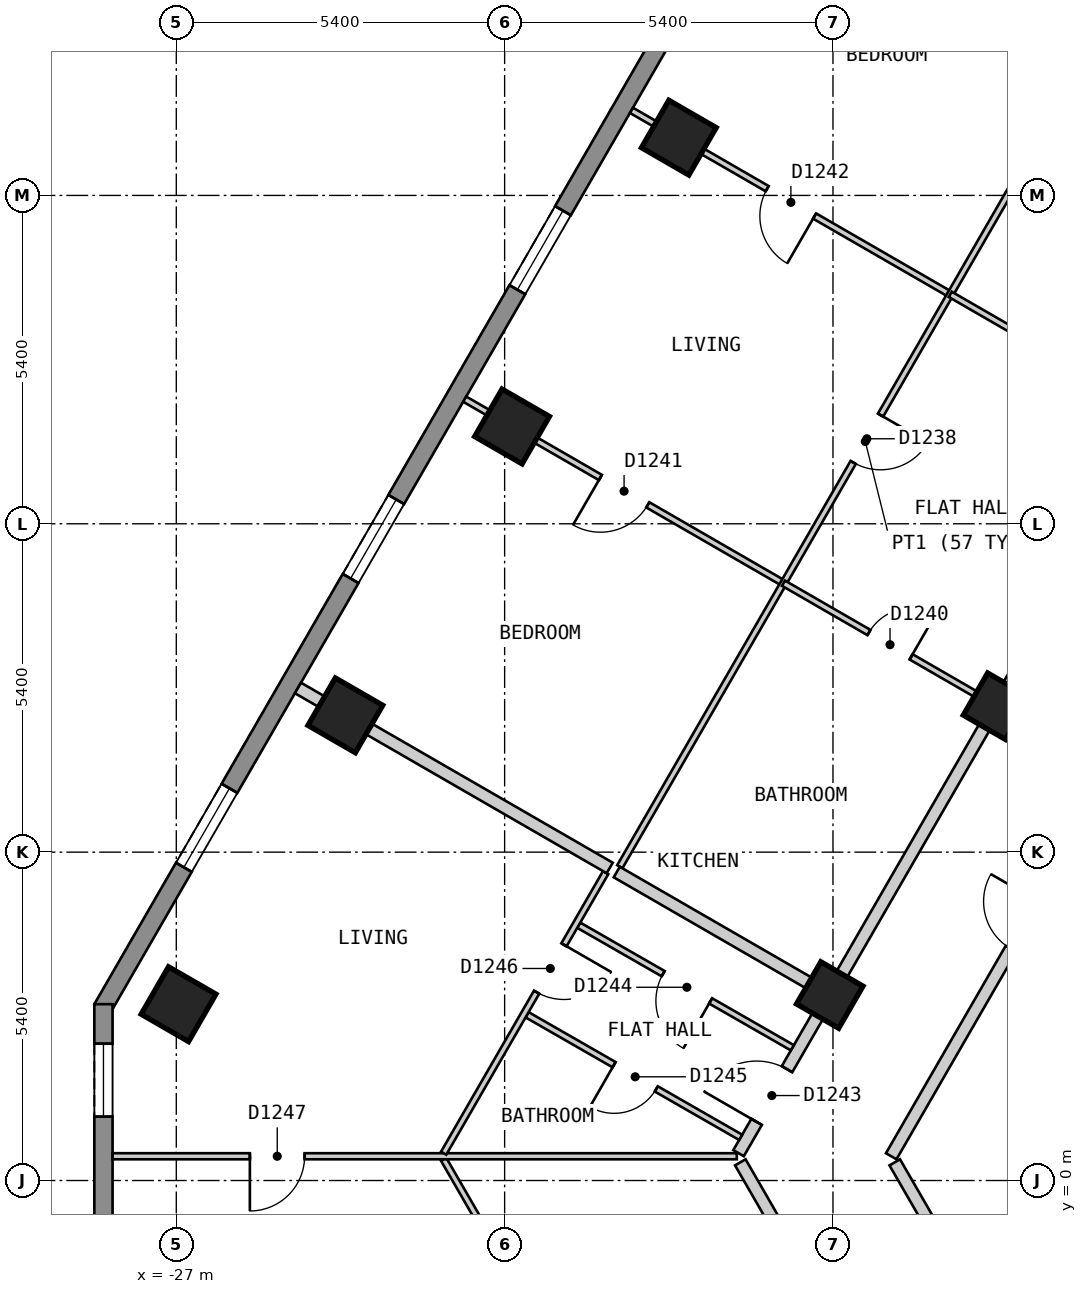
"""IFC4 building model, lengths in metres.
Left out: names, types, materials, properties, quantities, classifications, styles, units other than length and angle.
Written with IfcOpenShell. Run it as: python <this file> out.ifc"""

import sys

from ifc_helpers import new_model, si_unit, direction, frame, frame_2d, origin, origin_2d, place, context, subcontext, project, spatial, polyline, rectangle, outline, extrude, element, fill, save


model = new_model("IFC4")
c1 = context("Model", 3, precision=1e-05, world=origin(), true_north=direction((0.0, 1.0)))
c2 = subcontext(c1, "Body", "Model", "MODEL_VIEW")
j1 = project(units=[si_unit("LENGTHUNIT", "METRE"), si_unit("PLANEANGLEUNIT", "RADIAN")], contexts=[c1])
p1 = place(None, origin())
s1 = spatial("IfcSite", under=j1, at=p1, CompositionType="ELEMENT")
p2 = place(p1, origin())
s2 = spatial("IfcBuilding", under=s1, at=p2, CompositionType="ELEMENT")
p3 = place(p2, frame((0.0, 0.0, 129.6)))
s3 = spatial("IfcBuildingStorey", under=s2, at=p3, CompositionType="ELEMENT", Elevation=129.6)
for number, where, z_axis, x_axis in (
    (1, (-18.735, 17.15, 0.0), (0.0, 0.0, 1.0), (-0.5, -0.866, 0.0)),
    (2, (-21.478, 12.4, 0.0), (0.0, 0.0, 1.0), (-0.5, -0.866, 0.0)),
    (3, (-24.22, 7.65, 0.0), (0.0, 0.0, 1.0), (-0.5, -0.866, 0.0)),
    (4, (-26.963, 2.9, 0.0), (0.0, 0.0, 1.0), (-0.5, -0.866, 0.0)),
):
    element("IfcColumn", number, at=place(p3, frame(where, z_axis=z_axis, x_axis=x_axis)), inside=s3, PredefinedType="COLUMN", context=c2, shape_type="SweptSolid", body=[
        extrude(rectangle(XDim=0.9, YDim=0.9, at=origin_2d()), origin(), (0.0, 0.0, 1.0), 3.0),
    ])
for number, where, z_axis, x_axis in (
    (5, (-13.51, 7.8, 0.0), (0.0, 0.0, 1.0), (-0.5, -0.866, 0.0)),
    (6, (-16.253, 3.05, 0.0), (0.0, 0.0, 1.0), (-0.5, -0.866, 0.0)),
):
    element("IfcColumn", number, at=place(p3, frame(where, z_axis=z_axis, x_axis=x_axis)), inside=s3, PredefinedType="COLUMN", context=c2, shape_type="SweptSolid", body=[
        extrude(rectangle(XDim=0.8, YDim=0.8, at=origin_2d()), origin(), (0.0, 0.0, 1.0), 3.0),
    ])
p4 = place(p3, frame((-16.555, 23.025, 0.0), z_axis=(0.0, 0.0, 1.0), x_axis=(-0.500020536353, -0.866013546791, 0.0)))
e7 = element("IfcWall", 7, at=p4, inside=s3, PredefinedType="SOLIDWALL", context=c2, shape_type="SweptSolid", body=[
    extrude(outline(polyline([(0.0, -0.15), (23.325, -0.15), (23.245, 0.15), (0.08, 0.15), (0.0, -0.15)])), origin(), (0.0, 0.0, 1.0), 2.7),
])
p5 = place(p4, frame((2.685, 0.0, 0.15)))
e8 = element("IfcOpeningElement", 8, at=p5, cuts=e7, PredefinedType="OPENING", context=c2, shape_type="SweptSolid", body=[
    extrude(rectangle(XDim=1.5, YDim=2.1, at=frame_2d((0.75, 1.05))), frame((0.0, 0.16, 0.0), z_axis=(0.0, -1.0, 0.0), x_axis=(1.0, 0.0, 0.0)), (0.0, 0.0, 1.0), 0.32),
])
p6 = place(p4, frame((8.171, 0.0, 0.15)))
e9 = element("IfcOpeningElement", 9, at=p6, cuts=e7, PredefinedType="OPENING", context=c2, shape_type="SweptSolid", body=[
    extrude(rectangle(XDim=1.5, YDim=2.1, at=frame_2d((0.75, 1.05))), frame((0.0, 0.16, 0.0), z_axis=(0.0, -1.0, 0.0), x_axis=(1.0, 0.0, 0.0)), (0.0, 0.0, 1.0), 0.32),
])
p7 = place(p4, frame((13.655, 0.0, 0.15)))
e10 = element("IfcOpeningElement", 10, at=p7, cuts=e7, PredefinedType="OPENING", context=c2, shape_type="SweptSolid", body=[
    extrude(rectangle(XDim=1.5, YDim=2.1, at=frame_2d((0.75, 1.05))), frame((0.0, 0.16, 0.0), z_axis=(0.0, -1.0, 0.0), x_axis=(1.0, 0.0, 0.0)), (0.0, 0.0, 1.0), 0.32),
])
p8 = place(p4, frame((19.14, 0.0, 0.15)))
e11 = element("IfcOpeningElement", 11, at=p8, cuts=e7, PredefinedType="OPENING", context=c2, shape_type="SweptSolid", body=[
    extrude(rectangle(XDim=1.5, YDim=2.1, at=frame_2d((0.75, 1.05))), frame((0.0, 0.16, 0.0), z_axis=(0.0, -1.0, 0.0), x_axis=(1.0, 0.0, 0.0)), (0.0, 0.0, 1.0), 0.32),
])
p9 = place(p3, frame((-28.198, 2.9, 0.0), z_axis=(0.0, 0.0, 1.0), x_axis=(0.0, -1.0, 0.0)))
e12 = element("IfcWall", 12, at=p9, inside=s3, PredefinedType="SOLIDWALL", context=c2, shape_type="SweptSolid", body=[
    extrude(outline(polyline([(0.0, -0.15), (5.0, -0.15), (4.92, 0.15), (0.08, 0.15), (0.0, -0.15)])), origin(), (0.0, 0.0, 1.0), 2.7),
])
p10 = place(p9, frame((0.65, 0.0, 0.15)))
e13 = element("IfcOpeningElement", 13, at=p10, cuts=e12, PredefinedType="OPENING", context=c2, shape_type="SweptSolid", body=[
    extrude(rectangle(XDim=1.2, YDim=2.1, at=frame_2d((0.6, 1.05))), frame((0.0, 0.16, 0.0), z_axis=(0.0, -1.0, 0.0), x_axis=(1.0, 0.0, 0.0)), (0.0, 0.0, 1.0), 0.32),
])
p11 = place(p3, frame((-15.184, 0.299, 0.0), z_axis=(0.0, 0.0, 1.0), x_axis=(0.500149577091, -0.865939028186, 0.0)))
e14 = element("IfcWall", 14, at=p11, inside=s3, PredefinedType="PARTITIONING", context=c2, shape_type="SweptSolid", body=[
    extrude(rectangle(XDim=3.463, YDim=0.2, at=frame_2d((1.732, 0.0))), origin(), (0.0, 0.0, 1.0), 2.7),
])
p12 = place(p3, frame((-17.724, 0.299, 0.0), z_axis=(0.0, 0.0, 1.0), x_axis=(0.499910220442, -0.866077231832, 0.0)))
e15 = element("IfcWall", 15, at=p12, inside=s3, PredefinedType="PARTITIONING", context=c2, shape_type="SweptSolid", body=[
    extrude(rectangle(XDim=3.189, YDim=0.2, at=frame_2d((1.594, 0.0))), origin(), (0.0, 0.0, 1.0), 2.7),
])
p13 = place(p3, frame((-15.242, 0.399, 0.0), z_axis=(0.0, 0.0, 1.0), x_axis=(0.499953615651, 0.866052182145, 0.0)))
e16 = element("IfcWall", 16, at=p13, inside=s3, PredefinedType="PARTITIONING", context=c2, shape_type="SweptSolid", body=[
    extrude(rectangle(XDim=8.777, YDim=0.2, at=frame_2d((4.388, 0.0))), origin(), (0.0, 0.0, 1.0), 2.7),
])
p14 = place(p13, frame((3.938, 0.0, 0.0)))
e17 = element("IfcOpeningElement", 17, at=p14, cuts=e16, PredefinedType="OPENING", context=c2, shape_type="SweptSolid", body=[
    extrude(rectangle(XDim=0.9, YDim=2.1, at=frame_2d((0.45, 1.05))), frame((0.0, 0.11, 0.0), z_axis=(0.0, -1.0, 0.0), x_axis=(1.0, 0.0, 0.0)), (0.0, 0.0, 1.0), 0.22),
])
p15 = place(p3, frame((-17.753, 0.45, 0.0), z_axis=(0.0, 0.0, 1.0), x_axis=(0.499988552313, 0.866032013009, 0.0)))
e18 = element("IfcWall", 18, at=p15, inside=s3, PredefinedType="PARTITIONING", context=c2, shape_type="SweptSolid", body=[
    extrude(rectangle(XDim=16.917, YDim=0.2, at=frame_2d((8.458, 0.0))), origin(), (0.0, 0.0, 1.0), 2.7),
])
p16 = place(p15, frame((10.73, 0.0, 0.0)))
e19 = element("IfcOpeningElement", 19, at=p16, cuts=e18, PredefinedType="OPENING", context=c2, shape_type="SweptSolid", body=[
    extrude(rectangle(XDim=1.0, YDim=2.1, at=frame_2d((0.5, 1.05))), frame((0.0, 0.11, 0.0), z_axis=(0.0, -1.0, 0.0), x_axis=(1.0, 0.0, 0.0)), (0.0, 0.0, 1.0), 0.22),
])
p17 = place(p15, frame((0.594, 0.0, 0.0)))
e20 = element("IfcOpeningElement", 20, at=p17, cuts=e18, PredefinedType="OPENING", context=c2, shape_type="SweptSolid", body=[
    extrude(rectangle(XDim=1.0, YDim=2.1, at=frame_2d((0.5, 1.05))), frame((0.0, 0.11, 0.0), z_axis=(0.0, -1.0, 0.0), x_axis=(1.0, 0.0, 0.0)), (0.0, 0.0, 1.0), 0.22),
])
p18 = place(p3, frame((-22.603, 0.349, 0.0), z_axis=(0.0, 0.0, 1.0), x_axis=(0.499930403552, -0.866065581584, 0.0)))
e21 = element("IfcWall", 21, at=p18, inside=s3, PredefinedType="PARTITIONING", context=c2, shape_type="SweptSolid", body=[
    extrude(rectangle(XDim=3.117, YDim=0.1, at=frame_2d((1.558, 0.0))), origin(), (0.0, 0.0, 1.0), 2.7),
])
p19 = place(p3, frame((-20.381, 4.198, 0.0), z_axis=(0.0, 0.0, 1.0), x_axis=(0.867459321792, -0.497508115549, 0.0)))
e22 = element("IfcWall", 22, at=p19, inside=s3, PredefinedType="PARTITIONING", context=c2, shape_type="SweptSolid", body=[
    extrude(rectangle(XDim=4.05, YDim=0.1, at=frame_2d((2.025, 0.0))), origin(), (0.0, 0.0, 1.0), 2.7),
])
p20 = place(p19, frame((1.6, 0.0, 0.0)))
e23 = element("IfcOpeningElement", 23, at=p20, cuts=e22, PredefinedType="OPENING", context=c2, shape_type="SweptSolid", body=[
    extrude(rectangle(XDim=0.9, YDim=2.1, at=frame_2d((0.45, 1.05))), frame((0.0, 0.06, 0.0), z_axis=(0.0, -1.0, 0.0), x_axis=(1.0, 0.0, 0.0)), (0.0, 0.0, 1.0), 0.12),
])
p21 = place(p3, frame((-21.231, 2.726, 0.0), z_axis=(0.0, 0.0, 1.0), x_axis=(0.867314299312, -0.497760892607, 0.0)))
e24 = element("IfcWall", 24, at=p21, inside=s3, PredefinedType="PARTITIONING", context=c2, shape_type="SweptSolid", body=[
    extrude(rectangle(XDim=4.05, YDim=0.1, at=frame_2d((2.025, 0.0))), origin(), (0.0, 0.0, 1.0), 2.7),
])
p22 = place(p21, frame((1.65, 0.0, 0.0)))
e25 = element("IfcOpeningElement", 25, at=p22, cuts=e24, PredefinedType="OPENING", context=c2, shape_type="SweptSolid", body=[
    extrude(rectangle(XDim=0.8, YDim=2.1, at=frame_2d((0.4, 1.05))), frame((0.0, 0.06, 0.0), z_axis=(0.0, -1.0, 0.0), x_axis=(1.0, 0.0, 0.0)), (0.0, 0.0, 1.0), 0.12),
])
p23 = place(p3, frame((-22.257, 12.85, 0.0), z_axis=(0.0, 0.0, 1.0), x_axis=(0.866028448709, -0.499994725999, 0.0)))
e26 = element("IfcWall", 26, at=p23, inside=s3, PredefinedType="PARTITIONING", context=c2, shape_type="SweptSolid", body=[
    extrude(rectangle(XDim=6.054, YDim=0.1, at=frame_2d((3.027, 0.0))), origin(), (0.0, 0.0, 1.0), 2.7),
])
p24 = place(p23, frame((2.577, 0.0, 0.0)))
e27 = element("IfcOpeningElement", 27, at=p24, cuts=e26, PredefinedType="OPENING", context=c2, shape_type="SweptSolid", body=[
    extrude(rectangle(XDim=0.9, YDim=2.1, at=frame_2d((0.45, 1.05))), frame((0.0, 0.06, 0.0), z_axis=(0.0, -1.0, 0.0), x_axis=(1.0, 0.0, 0.0)), (0.0, 0.0, 1.0), 0.12),
])
p25 = place(p3, frame((-19.514, 17.599, 0.0), z_axis=(0.0, 0.0, 1.0), x_axis=(0.866088213453, -0.49989119468, 0.0)))
e28 = element("IfcWall", 28, at=p25, inside=s3, PredefinedType="PARTITIONING", context=c2, shape_type="SweptSolid", body=[
    extrude(rectangle(XDim=6.053, YDim=0.1, at=frame_2d((3.027, 0.0))), origin(), (0.0, 0.0, 1.0), 2.7),
])
p26 = place(p25, frame((2.577, 0.0, 0.0)))
e29 = element("IfcOpeningElement", 29, at=p26, cuts=e28, PredefinedType="OPENING", context=c2, shape_type="SweptSolid", body=[
    extrude(rectangle(XDim=0.9, YDim=2.1, at=frame_2d((0.45, 1.05))), frame((0.0, 0.06, 0.0), z_axis=(0.0, -1.0, 0.0), x_axis=(1.0, 0.0, 0.0)), (0.0, 0.0, 1.0), 0.12),
])
p27 = place(p3, frame((-28.048, 0.399, 0.0), z_axis=(0.0, 0.0, 1.0), x_axis=(1.0, 0.0, 0.0)))
e30 = element("IfcWall", 30, at=p27, inside=s3, PredefinedType="PARTITIONING", context=c2, shape_type="SweptSolid", body=[
    extrude(rectangle(XDim=10.266, YDim=0.1, at=frame_2d((5.133, 0.0))), origin(), (0.0, 0.0, 1.0), 2.7),
])
p28 = place(p27, frame((2.258, 0.0, 0.0)))
e31 = element("IfcOpeningElement", 31, at=p28, cuts=e30, PredefinedType="OPENING", context=c2, shape_type="SweptSolid", body=[
    extrude(rectangle(XDim=0.9, YDim=2.1, at=frame_2d((0.45, 1.05))), frame((0.0, 0.06, 0.0), z_axis=(0.0, -1.0, 0.0), x_axis=(1.0, 0.0, 0.0)), (0.0, 0.0, 1.0), 0.12),
])
p29 = place(p3, frame((-19.706, 5.16, 0.0), z_axis=(0.0, 0.0, 1.0), x_axis=(0.500003799672, 0.866023210032, 0.0)))
e32 = element("IfcWall", 32, at=p29, inside=s3, PredefinedType="PARTITIONING", context=c2, shape_type="SweptSolid", body=[
    extrude(rectangle(XDim=16.15, YDim=0.1, at=frame_2d((8.075, 0.0))), origin(), (0.0, 0.0, 1.0), 2.7),
])
p30 = place(p29, frame((7.677, 0.0, 0.0)))
e33 = element("IfcOpeningElement", 33, at=p30, cuts=e32, PredefinedType="OPENING", context=c2, shape_type="SweptSolid", body=[
    extrude(rectangle(XDim=0.9, YDim=2.1, at=frame_2d((0.45, 1.05))), frame((0.0, 0.06, 0.0), z_axis=(0.0, -1.0, 0.0), x_axis=(1.0, 0.0, 0.0)), (0.0, 0.0, 1.0), 0.12),
])
p31 = place(p3, frame((-22.603, 0.449, 0.0), z_axis=(0.0, 0.0, 1.0), x_axis=(0.500022588228, 0.866012362072, 0.0)))
e34 = element("IfcWall", 34, at=p31, inside=s3, PredefinedType="PARTITIONING", context=c2, shape_type="SweptSolid", body=[
    extrude(rectangle(XDim=5.328, YDim=0.1, at=frame_2d((2.664, 0.0))), origin(), (0.0, 0.0, 1.0), 2.7),
])
p32 = place(p31, frame((3.058, 0.0, 0.0)))
e35 = element("IfcOpeningElement", 35, at=p32, cuts=e34, PredefinedType="OPENING", context=c2, shape_type="SweptSolid", body=[
    extrude(rectangle(XDim=0.9, YDim=2.1, at=frame_2d((0.45, 1.05))), frame((0.0, 0.06, 0.0), z_axis=(0.0, -1.0, 0.0), x_axis=(1.0, 0.0, 0.0)), (0.0, 0.0, 1.0), 0.12),
])
p33 = place(p3, frame((-24.999, 8.1, 0.0), z_axis=(0.0, 0.0, 1.0), x_axis=(0.866013897511, -0.50001992892, 0.0)))
e36 = element("IfcWall", 36, at=p33, inside=s3, PredefinedType="PARTITIONING", context=c2, shape_type="SweptSolid", body=[
    extrude(rectangle(XDim=5.92, YDim=0.2, at=frame_2d((2.96, 0.0))), origin(), (0.0, 0.0, 1.0), 2.7),
])
p34 = place(p3, frame((-19.756, 5.073, 0.0), z_axis=(0.0, 0.0, 1.0), x_axis=(0.866014535457, -0.500018824023, 0.0)))
e37 = element("IfcWall", 37, at=p34, inside=s3, PredefinedType="PARTITIONING", context=c2, shape_type="SweptSolid", body=[
    extrude(rectangle(XDim=3.946, YDim=0.2, at=frame_2d((1.973, 0.0))), origin(), (0.0, 0.0, 1.0), 2.7),
])
p35 = place(p3, frame((-17.014, 9.823, 0.0), z_axis=(0.0, 0.0, 1.0), x_axis=(0.866076396086, -0.499911668341, 0.0)))
e38 = element("IfcWall", 38, at=p35, inside=s3, PredefinedType="PARTITIONING", context=c2, shape_type="SweptSolid", body=[
    extrude(rectangle(XDim=3.947, YDim=0.1, at=frame_2d((1.973, 0.0))), origin(), (0.0, 0.0, 1.0), 2.7),
])
p36 = place(p35, frame((1.623, 0.0, 0.0)))
e39 = element("IfcOpeningElement", 39, at=p36, cuts=e38, PredefinedType="OPENING", context=c2, shape_type="SweptSolid", body=[
    extrude(rectangle(XDim=0.8, YDim=2.1, at=frame_2d((0.4, 1.05))), frame((0.0, 0.06, 0.0), z_axis=(0.0, -1.0, 0.0), x_axis=(1.0, 0.0, 0.0)), (0.0, 0.0, 1.0), 0.12),
])
p37 = place(p3, frame((-14.271, 14.573, 0.0), z_axis=(0.0, 0.0, 1.0), x_axis=(0.866014535457, -0.500018824023, 0.0)))
e40 = element("IfcWall", 40, at=p37, inside=s3, PredefinedType="PARTITIONING", context=c2, shape_type="SweptSolid", body=[
    extrude(rectangle(XDim=3.946, YDim=0.1, at=frame_2d((1.973, 0.0))), origin(), (0.0, 0.0, 1.0), 2.7),
])
p38 = place(p37, frame((1.574, 0.0, 0.0)))
e41 = element("IfcOpeningElement", 41, at=p38, cuts=e40, PredefinedType="OPENING", context=c2, shape_type="SweptSolid", body=[
    extrude(rectangle(XDim=0.9, YDim=2.1, at=frame_2d((0.45, 1.05))), frame((0.0, 0.06, 0.0), z_axis=(0.0, -1.0, 0.0), x_axis=(1.0, 0.0, 0.0)), (0.0, 0.0, 1.0), 0.12),
])
p39 = place(p6, origin())
e42 = element("IfcWindow", 42, at=p39, inside=s3, PartitioningType="SINGLE_PANEL", PredefinedType="WINDOW", context=c2, shape_type="SweptSolid", body=[
    extrude(rectangle(XDim=1.5, YDim=2.1, at=frame_2d((0.75, 1.05))), frame((0.0, 0.03, 0.0), z_axis=(0.0, -1.0, 0.0), x_axis=(1.0, 0.0, 0.0)), (0.0, 0.0, 1.0), 0.06),
])
fill(e9, e42)
p40 = place(p7, origin())
e43 = element("IfcWindow", 43, at=p40, inside=s3, PartitioningType="SINGLE_PANEL", PredefinedType="WINDOW", context=c2, shape_type="SweptSolid", body=[
    extrude(rectangle(XDim=1.5, YDim=2.1, at=frame_2d((0.75, 1.05))), frame((0.0, 0.03, 0.0), z_axis=(0.0, -1.0, 0.0), x_axis=(1.0, 0.0, 0.0)), (0.0, 0.0, 1.0), 0.06),
])
fill(e10, e43)
p41 = place(p8, origin())
e44 = element("IfcWindow", 44, at=p41, inside=s3, PartitioningType="SINGLE_PANEL", PredefinedType="WINDOW", context=c2, shape_type="SweptSolid", body=[
    extrude(rectangle(XDim=1.5, YDim=2.1, at=frame_2d((0.75, 1.05))), frame((0.0, 0.03, 0.0), z_axis=(0.0, -1.0, 0.0), x_axis=(1.0, 0.0, 0.0)), (0.0, 0.0, 1.0), 0.06),
])
fill(e11, e44)
p42 = place(p10, origin())
e45 = element("IfcWindow", 45, at=p42, inside=s3, PartitioningType="SINGLE_PANEL", PredefinedType="WINDOW", context=c2, shape_type="SweptSolid", body=[
    extrude(rectangle(XDim=1.2, YDim=2.1, at=frame_2d((0.6, 1.05))), frame((0.0, 0.03, 0.0), z_axis=(0.0, -1.0, 0.0), x_axis=(1.0, 0.0, 0.0)), (0.0, 0.0, 1.0), 0.06),
])
fill(e13, e45)
p43 = place(p30, origin())
e46 = element("IfcDoor", 46, at=p43, inside=s3, OperationType="SINGLE_SWING_RIGHT", PredefinedType="DOOR", context=c2, shape_type="SweptSolid", body=[
    extrude(rectangle(XDim=0.9, YDim=2.1, at=frame_2d((0.45, 1.05))), frame((0.0, 0.025, 0.0), z_axis=(0.0, -1.0, 0.0), x_axis=(1.0, 0.0, 0.0)), (0.0, 0.0, 1.0), 0.05),
])
fill(e33, e46)
p44 = place(p36, origin())
e47 = element("IfcDoor", 47, at=p44, inside=s3, OperationType="SINGLE_SWING_RIGHT", PredefinedType="DOOR", context=c2, shape_type="SweptSolid", body=[
    extrude(rectangle(XDim=0.8, YDim=2.1, at=frame_2d((0.4, 1.05))), frame((0.0, 0.025, 0.0), z_axis=(0.0, -1.0, 0.0), x_axis=(1.0, 0.0, 0.0)), (0.0, 0.0, 1.0), 0.05),
])
fill(e39, e47)
p45 = place(p24, origin())
e48 = element("IfcDoor", 48, at=p45, inside=s3, OperationType="SINGLE_SWING_LEFT", PredefinedType="DOOR", context=c2, shape_type="SweptSolid", body=[
    extrude(rectangle(XDim=0.9, YDim=2.1, at=frame_2d((0.45, 1.05))), frame((0.0, 0.025, 0.0), z_axis=(0.0, -1.0, 0.0), x_axis=(1.0, 0.0, 0.0)), (0.0, 0.0, 1.0), 0.05),
])
fill(e27, e48)
p46 = place(p26, origin())
e49 = element("IfcDoor", 49, at=p46, inside=s3, OperationType="SINGLE_SWING_RIGHT", PredefinedType="DOOR", context=c2, shape_type="SweptSolid", body=[
    extrude(rectangle(XDim=0.9, YDim=2.1, at=frame_2d((0.45, 1.05))), frame((0.0, 0.025, 0.0), z_axis=(0.0, -1.0, 0.0), x_axis=(1.0, 0.0, 0.0)), (0.0, 0.0, 1.0), 0.05),
])
fill(e29, e49)
p47 = place(p17, origin())
e50 = element("IfcDoor", 50, at=p47, inside=s3, OperationType="SINGLE_SWING_LEFT", PredefinedType="DOOR", context=c2, shape_type="SweptSolid", body=[
    extrude(rectangle(XDim=1.0, YDim=2.1, at=frame_2d((0.5, 1.05))), frame((0.0, 0.025, 0.0), z_axis=(0.0, -1.0, 0.0), x_axis=(1.0, 0.0, 0.0)), (0.0, 0.0, 1.0), 0.05),
])
fill(e20, e50)
p48 = place(p20, origin())
e51 = element("IfcDoor", 51, at=p48, inside=s3, OperationType="SINGLE_SWING_RIGHT", PredefinedType="DOOR", context=c2, shape_type="SweptSolid", body=[
    extrude(rectangle(XDim=0.9, YDim=2.1, at=frame_2d((0.45, 1.05))), frame((0.0, 0.025, 0.0), z_axis=(0.0, -1.0, 0.0), x_axis=(1.0, 0.0, 0.0)), (0.0, 0.0, 1.0), 0.05),
])
fill(e23, e51)
p49 = place(p22, origin())
e52 = element("IfcDoor", 52, at=p49, inside=s3, OperationType="SINGLE_SWING_LEFT", PredefinedType="DOOR", context=c2, shape_type="SweptSolid", body=[
    extrude(rectangle(XDim=0.8, YDim=2.1, at=frame_2d((0.4, 1.05))), frame((0.0, 0.025, 0.0), z_axis=(0.0, -1.0, 0.0), x_axis=(1.0, 0.0, 0.0)), (0.0, 0.0, 1.0), 0.05),
])
fill(e25, e52)
p50 = place(p32, origin())
e53 = element("IfcDoor", 53, at=p50, inside=s3, OperationType="SINGLE_SWING_RIGHT", PredefinedType="DOOR", context=c2, shape_type="SweptSolid", body=[
    extrude(rectangle(XDim=0.9, YDim=2.1, at=frame_2d((0.45, 1.05))), frame((0.0, 0.025, 0.0), z_axis=(0.0, -1.0, 0.0), x_axis=(1.0, 0.0, 0.0)), (0.0, 0.0, 1.0), 0.05),
])
fill(e35, e53)
p51 = place(p28, origin())
e54 = element("IfcDoor", 54, at=p51, inside=s3, OperationType="SINGLE_SWING_LEFT", PredefinedType="DOOR", context=c2, shape_type="SweptSolid", body=[
    extrude(rectangle(XDim=0.9, YDim=2.1, at=frame_2d((0.45, 1.05))), frame((0.0, 0.025, 0.0), z_axis=(0.0, -1.0, 0.0), x_axis=(1.0, 0.0, 0.0)), (0.0, 0.0, 1.0), 0.05),
])
fill(e31, e54)
save(model, sys.argv[1])
